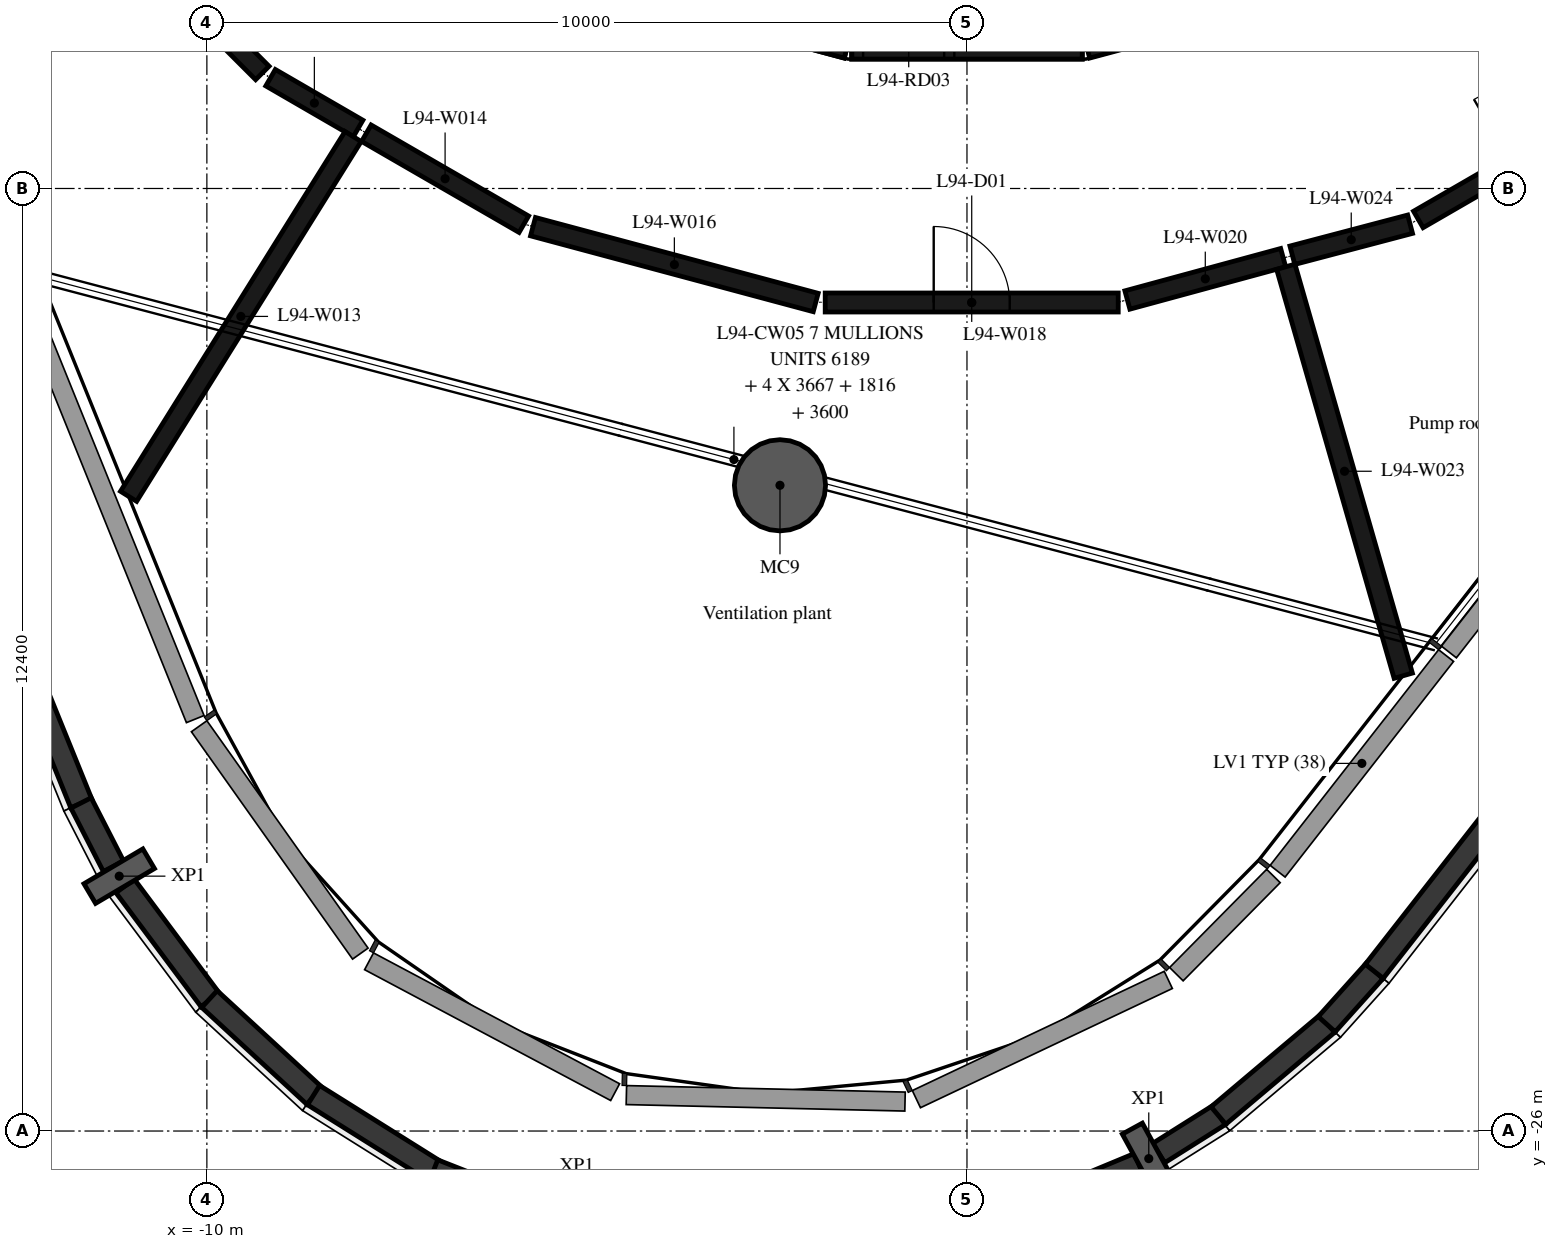
"""IFC4 building model, lengths in metres.
Left out: names, types, materials, properties, quantities, classifications, styles, units other than length and angle.
Written with IfcOpenShell. Run it as: python <this file> out.ifc"""

import sys

from ifc_helpers import new_model, si_unit, direction, frame, frame_2d, origin, origin_2d, place, context, subcontext, project, spatial, rectangle, hollow_circle, i_section, extrude, element, fill, save


model = new_model("IFC4")
c1 = context("Model", 3, precision=1e-05, world=origin(), true_north=direction((0.0, 1.0)))
c2 = subcontext(c1, "Body", "Model", "MODEL_VIEW")
j1 = project(units=[si_unit("LENGTHUNIT", "METRE"), si_unit("PLANEANGLEUNIT", "RADIAN")], contexts=[c1])
p1 = place(None, origin())
s1 = spatial("IfcSite", under=j1, at=p1, CompositionType="ELEMENT")
p2 = place(p1, origin())
s2 = spatial("IfcBuilding", under=s1, at=p2, CompositionType="ELEMENT")
p3 = place(p2, frame((0.0, 0.0, 366.2)))
s3 = spatial("IfcBuildingStorey", under=s2, at=p3, CompositionType="ELEMENT", Elevation=366.2)
p4 = place(p3, frame((-2.46, -17.505, -0.38), z_axis=(0.0, 0.0, 1.0), x_axis=(1.0, 0.0, 0.0)))
e1 = element("IfcColumn", 1, at=p4, inside=s3, PredefinedType="COLUMN", context=c2, shape_type="SweptSolid", body=[
    extrude(hollow_circle(Radius=0.6, WallThickness=0.03, at=origin_2d()), origin(), (0.0, 0.0, 1.0), 5.54),
])
for number, where, z_axis, x_axis in (
    (2, (-11.153, -22.647, -0.38), (0.0, 0.0, 1.0), (-0.509, 0.861, 0.0)),
    (3, (2.392, -26.363, -0.38), (0.0, 0.0, 1.0), (-0.877, -0.48, 0.0)),
):
    element("IfcColumn", number, at=place(p3, frame(where, z_axis=z_axis, x_axis=x_axis)), inside=s3, PredefinedType="COLUMN", context=c2, shape_type="SweptSolid", body=[
        extrude(i_section(OverallWidth=0.3, OverallDepth=0.9, WebThickness=0.019, FlangeThickness=0.035, FilletRadius=0.03, at=origin_2d()), origin(), (0.0, 0.0, 1.0), 5.58),
    ])
p5 = place(p3, frame((-14.109, -15.634, 5.2), z_axis=(0.0, 0.0, 1.0), x_axis=(0.375946149404, -0.926641512532, 0.0)))
e4 = element("IfcWall", 4, at=p5, inside=s3, PredefinedType="PARAPET", context=c2, shape_type="SweptSolid", body=[
    extrude(rectangle(XDim=6.536, YDim=0.3, at=frame_2d((3.268, 0.0))), origin(), (0.0, 0.0, 1.0), 0.58),
])
p6 = place(p3, frame((-11.655, -21.684, 5.2), z_axis=(0.0, 0.0, 1.0), x_axis=(0.455850676056, -0.890056268524, 0.0)))
e5 = element("IfcWall", 5, at=p6, inside=s3, PredefinedType="PARAPET", context=c2, shape_type="SweptSolid", body=[
    extrude(rectangle(XDim=0.936, YDim=0.3, at=frame_2d((0.468, 0.0))), origin(), (0.0, 0.0, 1.0), 0.58),
])
p7 = place(p3, frame((-11.076, -22.775, 5.2), z_axis=(0.0, 0.0, 1.0), x_axis=(0.598328331691, -0.801251026518, 0.0)))
e6 = element("IfcWall", 6, at=p7, inside=s3, PredefinedType="PARAPET", context=c2, shape_type="SweptSolid", body=[
    extrude(rectangle(XDim=1.871, YDim=0.3, at=frame_2d((0.936, 0.0))), origin(), (0.0, 0.0, 1.0), 0.58),
])
for number, where, z_axis, x_axis in (
    (7, (-9.966, -24.264, 5.2), (0.0, 0.0, 1.0), (0.735, -0.678, 0.0)),
    (8, (-8.596, -25.528, 5.2), (0.0, 0.0, 1.0), (0.847, -0.531, 0.0)),
):
    element("IfcWall", number, at=place(p3, frame(where, z_axis=z_axis, x_axis=x_axis)), inside=s3, PredefinedType="PARAPET", context=c2, shape_type="SweptSolid", body=[
        extrude(rectangle(XDim=1.878, YDim=0.3, at=frame_2d((0.939, 0.0))), origin(), (0.0, 0.0, 1.0), 0.58),
    ])
p8 = place(p3, frame((-7.017, -26.519, 5.2), z_axis=(0.0, 0.0, 1.0), x_axis=(0.930470422732, -0.366367018741, 0.0)))
e9 = element("IfcWall", 9, at=p8, inside=s3, PredefinedType="PARAPET", context=c2, shape_type="SweptSolid", body=[
    extrude(rectangle(XDim=1.871, YDim=0.3, at=frame_2d((0.935, 0.0))), origin(), (0.0, 0.0, 1.0), 0.58),
])
p9 = place(p3, frame((0.532, -27.152, 5.2), z_axis=(0.0, 0.0, 1.0), x_axis=(0.923416325606, 0.383799804071, 0.0)))
e10 = element("IfcWall", 10, at=p9, inside=s3, PredefinedType="PARAPET", context=c2, shape_type="SweptSolid", body=[
    extrude(rectangle(XDim=1.871, YDim=0.3, at=frame_2d((0.936, 0.0))), origin(), (0.0, 0.0, 1.0), 0.58),
])
p10 = place(p3, frame((2.523, -26.29, 5.2), z_axis=(0.0, 0.0, 1.0), x_axis=(0.846180693164, 0.532896082287, 0.0)))
e11 = element("IfcWall", 11, at=p10, inside=s3, PredefinedType="PARAPET", context=c2, shape_type="SweptSolid", body=[
    extrude(rectangle(XDim=0.938, YDim=0.3, at=frame_2d((0.469, 0.0))), origin(), (0.0, 0.0, 1.0), 0.58),
])
p11 = place(p3, frame((3.308, -25.796, 5.2), z_axis=(0.0, 0.0, 1.0), x_axis=(0.764363704837, 0.644785333835, 0.0)))
e12 = element("IfcWall", 12, at=p11, inside=s3, PredefinedType="PARAPET", context=c2, shape_type="SweptSolid", body=[
    extrude(rectangle(XDim=1.874, YDim=0.3, at=frame_2d((0.937, 0.0))), origin(), (0.0, 0.0, 1.0), 0.58),
])
p12 = place(p3, frame((4.733, -24.595, 5.2), z_axis=(0.0, 0.0, 1.0), x_axis=(0.668060859654, 0.744106637384, 0.0)))
e13 = element("IfcWall", 13, at=p12, inside=s3, PredefinedType="PARAPET", context=c2, shape_type="SweptSolid", body=[
    extrude(rectangle(XDim=0.941, YDim=0.3, at=frame_2d((0.47, 0.0))), origin(), (0.0, 0.0, 1.0), 0.58),
])
p13 = place(p3, frame((5.358, -23.899, 5.2), z_axis=(0.0, 0.0, 1.0), x_axis=(0.61616902221, 0.787613951165, 0.0)))
e14 = element("IfcWall", 14, at=p13, inside=s3, PredefinedType="PARAPET", context=c2, shape_type="SweptSolid", body=[
    extrude(rectangle(XDim=3.735, YDim=0.3, at=frame_2d((1.868, 0.0))), origin(), (0.0, 0.0, 1.0), 0.58),
])
for number, where, z_axis, x_axis in (
    (15, (1.55, -11.643, 0.0), (0.0, 0.0, 1.0), (0.966, 0.259, 0.0)),
    (16, (-4.479, -10.858, 0.0), (0.0, 0.0, 1.0), (0.966, -0.259, 0.0)),
):
    element("IfcWall", number, at=place(p3, frame(where, z_axis=z_axis, x_axis=x_axis)), inside=s3, PredefinedType="SHEAR", context=c2, shape_type="SweptSolid", body=[
        extrude(rectangle(XDim=3.033, YDim=0.5, at=frame_2d((1.516, 0.0))), origin(), (0.0, 0.0, 1.0), 4.8),
    ])
p14 = place(p3, frame((-1.516, -11.647, 0.0), z_axis=(0.0, 0.0, 1.0), x_axis=(1.0, 0.0, 0.0)))
e17 = element("IfcWall", 17, at=p14, inside=s3, PredefinedType="SHEAR", context=c2, shape_type="SweptSolid", body=[
    extrude(rectangle(XDim=3.033, YDim=0.5, at=frame_2d((1.516, 0.0))), origin(), (0.0, 0.0, 1.0), 4.8),
])
p15 = place(p14, frame((0.016, 0.0, 0.0)))
e18 = element("IfcOpeningElement", 18, at=p15, cuts=e17, PredefinedType="OPENING", context=c2, shape_type="SweptSolid", body=[
    extrude(rectangle(XDim=1.2, YDim=2.1, at=frame_2d((0.6, 1.05))), frame((0.0, 0.26, 0.0), z_axis=(0.0, -1.0, 0.0), x_axis=(1.0, 0.0, 0.0)), (0.0, 0.0, 1.0), 0.52),
])
p16 = place(p3, frame((-4.479, -10.858, 5.2), z_axis=(0.0, 0.0, 1.0), x_axis=(0.965948410781, -0.258734743916, 0.0)))
e19 = element("IfcWall", 19, at=p16, inside=s3, PredefinedType="SHEAR", context=c2, shape_type="SweptSolid", body=[
    extrude(rectangle(XDim=3.033, YDim=0.5, at=frame_2d((1.516, 0.0))), origin(), (0.0, 0.0, 1.0), 3.4),
])
p17 = place(p3, frame((-1.516, -11.647, 5.2), z_axis=(0.0, 0.0, 1.0), x_axis=(1.0, 0.0, 0.0)))
e20 = element("IfcWall", 20, at=p17, inside=s3, PredefinedType="SHEAR", context=c2, shape_type="SweptSolid", body=[
    extrude(rectangle(XDim=3.033, YDim=0.5, at=frame_2d((1.516, 0.0))), origin(), (0.0, 0.0, 1.0), 3.4),
])
p18 = place(p17, frame((0.15, 0.0, 0.0)))
e21 = element("IfcOpeningElement", 21, at=p18, cuts=e20, PredefinedType="OPENING", context=c2, shape_type="SweptSolid", body=[
    extrude(rectangle(XDim=1.2, YDim=2.1, at=frame_2d((0.6, 1.05))), frame((0.0, 0.26, 0.0), z_axis=(0.0, -1.0, 0.0), x_axis=(1.0, 0.0, 0.0)), (0.0, 0.0, 1.0), 0.52),
])
p19 = place(p3, frame((-11.992, -9.358, 0.0), z_axis=(0.0, 0.0, 1.0), x_axis=(0.707106781187, -0.707106781187, 0.0)))
e22 = element("IfcWall", 22, at=p19, inside=s3, PredefinedType="PARTITIONING", context=c2, shape_type="SweptSolid", body=[
    extrude(rectangle(XDim=3.849, YDim=0.25, at=frame_2d((1.925, 0.0))), origin(), (0.0, 0.0, 1.0), 4.8),
])
p20 = place(p3, frame((-9.162, -12.143, 0.0), z_axis=(0.0, 0.0, 1.0), x_axis=(0.865225325987, -0.501383221968, 0.0)))
e23 = element("IfcWall", 23, at=p20, inside=s3, PredefinedType="PARTITIONING", context=c2, shape_type="SweptSolid", body=[
    extrude(rectangle(XDim=1.331, YDim=0.25, at=frame_2d((0.666, 0.0))), origin(), (0.0, 0.0, 1.0), 4.8),
])
p21 = place(p3, frame((-8.076, -12.916, 0.0), z_axis=(0.0, 0.0, 1.0), x_axis=(-0.529377395223, -0.848386452878, 0.0)))
e24 = element("IfcWall", 24, at=p21, inside=s3, PredefinedType="PARTITIONING", context=c2, shape_type="SweptSolid", body=[
    extrude(rectangle(XDim=5.58, YDim=0.25, at=frame_2d((2.79, 0.0))), origin(), (0.0, 0.0, 1.0), 4.8),
])
p22 = place(p3, frame((-7.902, -12.873, 0.0), z_axis=(0.0, 0.0, 1.0), x_axis=(0.865777653854, -0.500428870157, 0.0)))
e25 = element("IfcWall", 25, at=p22, inside=s3, PredefinedType="PARTITIONING", context=c2, shape_type="SweptSolid", body=[
    extrude(rectangle(XDim=2.393, YDim=0.25, at=frame_2d((1.197, 0.0))), origin(), (0.0, 0.0, 1.0), 4.8),
])
p23 = place(p3, frame((-5.709, -14.102, 0.0), z_axis=(0.0, 0.0, 1.0), x_axis=(0.965845546311, -0.259118468411, 0.0)))
e26 = element("IfcWall", 26, at=p23, inside=s3, PredefinedType="PARTITIONING", context=c2, shape_type="SweptSolid", body=[
    extrude(rectangle(XDim=3.851, YDim=0.25, at=frame_2d((1.925, 0.0))), origin(), (0.0, 0.0, 1.0), 4.8),
])
p24 = place(p3, frame((-1.865, -15.1, 0.0), z_axis=(0.0, 0.0, 1.0), x_axis=(1.0, 0.0, 0.0)))
e27 = element("IfcWall", 27, at=p24, inside=s3, PredefinedType="PARTITIONING", context=c2, shape_type="SweptSolid", body=[
    extrude(rectangle(XDim=3.855, YDim=0.25, at=frame_2d((1.927, 0.0))), origin(), (0.0, 0.0, 1.0), 4.8),
])
p25 = place(p24, frame((1.427, 0.0, 0.0)))
e28 = element("IfcOpeningElement", 28, at=p25, cuts=e27, PredefinedType="OPENING", context=c2, shape_type="SweptSolid", body=[
    extrude(rectangle(XDim=1.0, YDim=2.1, at=frame_2d((0.5, 1.05))), frame((0.0, 0.135, 0.0), z_axis=(0.0, -1.0, 0.0), x_axis=(1.0, 0.0, 0.0)), (0.0, 0.0, 1.0), 0.27),
])
p26 = place(p3, frame((2.111, -15.067, 0.0), z_axis=(0.0, 0.0, 1.0), x_axis=(0.964975741564, 0.262339128216, 0.0)))
e29 = element("IfcWall", 29, at=p26, inside=s3, PredefinedType="PARTITIONING", context=c2, shape_type="SweptSolid", body=[
    extrude(rectangle(XDim=2.124, YDim=0.25, at=frame_2d((1.062, 0.0))), origin(), (0.0, 0.0, 1.0), 4.8),
])
p27 = place(p3, frame((4.195, -14.63, 0.0), z_axis=(0.0, 0.0, 1.0), x_axis=(0.276091885253, -0.961131245407, 0.0)))
e30 = element("IfcWall", 30, at=p27, inside=s3, PredefinedType="PARTITIONING", context=c2, shape_type="SweptSolid", body=[
    extrude(rectangle(XDim=5.597, YDim=0.25, at=frame_2d((2.799, 0.0))), origin(), (0.0, 0.0, 1.0), 4.8),
])
p28 = place(p3, frame((4.281, -14.478, 0.0), z_axis=(0.0, 0.0, 1.0), x_axis=(0.966999489871, 0.254778308709, 0.0)))
e31 = element("IfcWall", 31, at=p28, inside=s3, PredefinedType="PARTITIONING", context=c2, shape_type="SweptSolid", body=[
    extrude(rectangle(XDim=1.602, YDim=0.25, at=frame_2d((0.801, 0.0))), origin(), (0.0, 0.0, 1.0), 4.8),
])
p29 = place(p3, frame((5.938, -14.007, 0.0), z_axis=(0.0, 0.0, 1.0), x_axis=(0.865615852585, 0.500708693508, 0.0)))
e32 = element("IfcWall", 32, at=p29, inside=s3, PredefinedType="PARTITIONING", context=c2, shape_type="SweptSolid", body=[
    extrude(rectangle(XDim=3.849, YDim=0.25, at=frame_2d((1.925, 0.0))), origin(), (0.0, 0.0, 1.0), 4.8),
])
p30 = place(p29, frame((1.425, 0.0, 0.0)))
e33 = element("IfcOpeningElement", 33, at=p30, cuts=e32, PredefinedType="OPENING", context=c2, shape_type="SweptSolid", body=[
    extrude(rectangle(XDim=1.0, YDim=2.1, at=frame_2d((0.5, 1.05))), frame((0.0, 0.135, 0.0), z_axis=(0.0, -1.0, 0.0), x_axis=(1.0, 0.0, 0.0)), (0.0, 0.0, 1.0), 0.27),
])
p31 = place(p25, origin())
e34 = element("IfcDoor", 34, at=p31, inside=s3, OperationType="SINGLE_SWING_LEFT", PredefinedType="DOOR", context=c2, shape_type="SweptSolid", body=[
    extrude(rectangle(XDim=1.0, YDim=2.1, at=frame_2d((0.5, 1.05))), frame((0.0, 0.025, 0.0), z_axis=(0.0, -1.0, 0.0), x_axis=(1.0, 0.0, 0.0)), (0.0, 0.0, 1.0), 0.05),
])
fill(e28, e34)
save(model, sys.argv[1])
